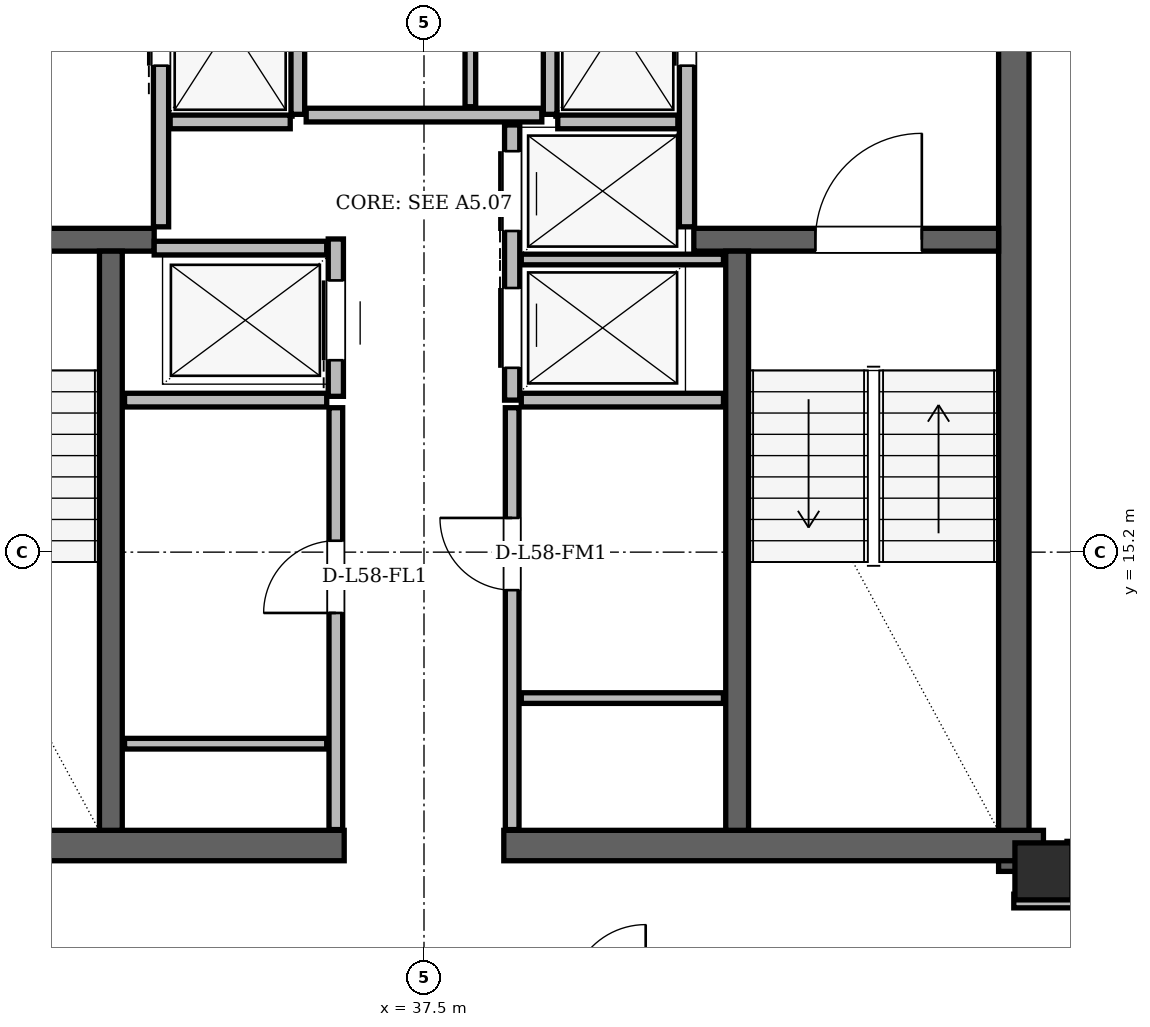
"""IFC4 building model, lengths in metres.
Left out: names, types, materials, properties, quantities, classifications, styles, units other than length and angle.
Written with IfcOpenShell. Run it as: python <this file> out.ifc"""

import sys

from ifc_helpers import new_model, si_unit, direction, frame, frame_2d, origin, origin_2d, place, context, subcontext, project, spatial, rectangle, hollow_rectangle, extrude, element, fill, save


model = new_model("IFC4")
c1 = context("Model", 3, precision=1e-05, world=origin(), true_north=direction((0.0, 1.0)))
c2 = subcontext(c1, "Body", "Model", "MODEL_VIEW")
j1 = project(units=[si_unit("LENGTHUNIT", "METRE"), si_unit("PLANEANGLEUNIT", "RADIAN")], contexts=[c1])
p1 = place(None, origin())
s1 = spatial("IfcSite", under=j1, at=p1, CompositionType="ELEMENT")
p2 = place(p1, origin())
s2 = spatial("IfcBuilding", under=s1, at=p2, CompositionType="ELEMENT")
p3 = place(p2, frame((0.0, 0.0, 219.9)))
s3 = spatial("IfcBuildingStorey", under=s2, at=p3, CompositionType="ELEMENT", Elevation=219.9)
p4 = place(p3, frame((45.65, 11.0, 0.0), z_axis=(0.0, 0.0, 1.0), x_axis=(1.0, 0.0, 0.0)))
e1 = element("IfcColumn", 1, at=p4, inside=s3, PredefinedType="COLUMN", context=c2, shape_type="SweptSolid", body=[
    extrude(hollow_rectangle(XDim=0.75, YDim=0.75, WallThickness=0.06, at=origin_2d()), origin(), (0.0, 0.0, 1.0), 3.6),
])
p5 = place(p3, frame((45.26, 11.0, 0.0), z_axis=(0.0, 0.0, 1.0), x_axis=(0.0, 1.0, 0.0)))
e2 = element("IfcWall", 2, at=p5, inside=s3, PredefinedType="SHEAR", context=c2, shape_type="SweptSolid", body=[
    extrude(rectangle(XDim=13.3, YDim=0.4, at=frame_2d((6.65, 0.0))), origin(), (0.0, 0.0, 1.0), 3.38),
])
for number, where, z_axis, x_axis in (
    (3, (29.35, 11.34, 0.0), (0.0, 0.0, 1.0), (1.0, 0.0, 0.0)),
    (4, (38.55, 11.34, 0.0), (0.0, 0.0, 1.0), (1.0, 0.0, 0.0)),
):
    element("IfcWall", number, at=place(p3, frame(where, z_axis=z_axis, x_axis=x_axis)), inside=s3, PredefinedType="SHEAR", context=c2, shape_type="SweptSolid", body=[
        extrude(rectangle(XDim=7.1, YDim=0.4, at=frame_2d((3.55, 0.0))), origin(), (0.0, 0.0, 1.0), 3.38),
    ])
p6 = place(p3, frame((29.94, 19.31, 0.0), z_axis=(0.0, 0.0, 1.0), x_axis=(1.0, 0.0, 0.0)))
e5 = element("IfcWall", 5, at=p6, inside=s3, PredefinedType="SHEAR", context=c2, shape_type="SweptSolid", body=[
    extrude(rectangle(XDim=4.01, YDim=0.3, at=frame_2d((2.005, 0.0))), origin(), (0.0, 0.0, 1.0), 3.38),
])
p7 = place(p6, frame((1.01, 0.0, 0.0)))
e6 = element("IfcOpeningElement", 6, at=p7, cuts=e5, PredefinedType="OPENING", context=c2, shape_type="SweptSolid", body=[
    extrude(rectangle(XDim=1.4, YDim=2.2, at=frame_2d((0.7, 1.1))), frame((0.0, 0.15, 0.0), z_axis=(0.0, -1.0, 0.0), x_axis=(1.0, 0.0, 0.0)), (0.0, 0.0, 1.0), 0.3),
])
p8 = place(p3, frame((41.05, 19.31, 0.0), z_axis=(0.0, 0.0, 1.0), x_axis=(1.0, 0.0, 0.0)))
e7 = element("IfcWall", 7, at=p8, inside=s3, PredefinedType="SHEAR", context=c2, shape_type="SweptSolid", body=[
    extrude(rectangle(XDim=4.01, YDim=0.3, at=frame_2d((2.005, 0.0))), origin(), (0.0, 0.0, 1.0), 3.38),
])
p9 = place(p8, frame((1.6, 0.0, 0.0)))
e8 = element("IfcOpeningElement", 8, at=p9, cuts=e7, PredefinedType="OPENING", context=c2, shape_type="SweptSolid", body=[
    extrude(rectangle(XDim=1.4, YDim=2.2, at=frame_2d((0.7, 1.1))), frame((0.0, 0.15, 0.0), z_axis=(0.0, -1.0, 0.0), x_axis=(1.0, 0.0, 0.0)), (0.0, 0.0, 1.0), 0.3),
])
for number, where, z_axis, x_axis in (
    (9, (33.38, 11.54, 0.0), (0.0, 0.0, 1.0), (0.0, 1.0, 0.0)),
    (10, (41.62, 11.54, 0.0), (0.0, 0.0, 1.0), (0.0, 1.0, 0.0)),
):
    element("IfcWall", number, at=place(p3, frame(where, z_axis=z_axis, x_axis=x_axis)), inside=s3, PredefinedType="SHEAR", context=c2, shape_type="SweptSolid", body=[
        extrude(rectangle(XDim=7.62, YDim=0.3, at=frame_2d((3.81, 0.0))), origin(), (0.0, 0.0, 1.0), 3.38),
    ])
p10 = place(p3, frame((59.113, 11.428, 0.0), z_axis=(0.0, 0.0, 1.0), x_axis=(-0.499994551211, 0.866028549621, 0.0)))
e11 = element("IfcWall", 11, at=p10, inside=s3, PredefinedType="SOLIDWALL", context=c2, shape_type="SweptSolid", body=[
    extrude(rectangle(XDim=36.634, YDim=0.29, at=frame_2d((18.317, 0.0))), origin(), (0.0, 0.0, 1.0), 2.677),
])
p11 = place(p10, frame((3.429, 0.0, 0.0)))
e12 = element("IfcOpeningElement", 12, at=p11, cuts=e11, PredefinedType="OPENING", context=c2, shape_type="SweptSolid", body=[
    extrude(rectangle(XDim=1.5, YDim=2.2, at=frame_2d((0.75, 1.1))), frame((0.0, 0.145, 0.0), z_axis=(0.0, -1.0, 0.0), x_axis=(1.0, 0.0, 0.0)), (0.0, 0.0, 1.0), 0.29),
])
p12 = place(p10, frame((27.099, 0.0, 0.0)))
e13 = element("IfcOpeningElement", 13, at=p12, cuts=e11, PredefinedType="OPENING", context=c2, shape_type="SweptSolid", body=[
    extrude(rectangle(XDim=1.5, YDim=2.2, at=frame_2d((0.75, 1.1))), frame((0.0, 0.145, 0.0), z_axis=(0.0, -1.0, 0.0), x_axis=(1.0, 0.0, 0.0)), (0.0, 0.0, 1.0), 0.29),
])
p13 = place(p10, frame((7.895, 0.0, 0.85)))
e14 = element("IfcOpeningElement", 14, at=p13, cuts=e11, PredefinedType="OPENING", context=c2, shape_type="SweptSolid", body=[
    extrude(rectangle(XDim=1.2, YDim=1.48, at=frame_2d((0.6, 0.74))), frame((0.0, 0.145, 0.0), z_axis=(0.0, -1.0, 0.0), x_axis=(1.0, 0.0, 0.0)), (0.0, 0.0, 1.0), 0.29),
])
p14 = place(p10, frame((1.262, 0.0, 0.85)))
e15 = element("IfcOpeningElement", 15, at=p14, cuts=e11, PredefinedType="OPENING", context=c2, shape_type="SweptSolid", body=[
    extrude(rectangle(XDim=1.2, YDim=1.48, at=frame_2d((0.6, 0.74))), frame((0.0, 0.145, 0.0), z_axis=(0.0, -1.0, 0.0), x_axis=(1.0, 0.0, 0.0)), (0.0, 0.0, 1.0), 0.29),
])
p15 = place(p10, frame((12.216, 0.0, 0.85)))
e16 = element("IfcOpeningElement", 16, at=p15, cuts=e11, PredefinedType="OPENING", context=c2, shape_type="SweptSolid", body=[
    extrude(rectangle(XDim=2.0, YDim=1.717, at=frame_2d((1.0, 0.858))), frame((0.0, 0.145, 0.0), z_axis=(0.0, -1.0, 0.0), x_axis=(1.0, 0.0, 0.0)), (0.0, 0.0, 1.0), 0.29),
])
p16 = place(p10, frame((17.285, 0.0, 0.85)))
e17 = element("IfcOpeningElement", 17, at=p16, cuts=e11, PredefinedType="OPENING", context=c2, shape_type="SweptSolid", body=[
    extrude(rectangle(XDim=1.4, YDim=1.6, at=frame_2d((0.7, 0.8))), frame((0.0, 0.145, 0.0), z_axis=(0.0, -1.0, 0.0), x_axis=(1.0, 0.0, 0.0)), (0.0, 0.0, 1.0), 0.29),
])
p17 = place(p10, frame((20.673, 0.0, 0.85)))
e18 = element("IfcOpeningElement", 18, at=p17, cuts=e11, PredefinedType="OPENING", context=c2, shape_type="SweptSolid", body=[
    extrude(rectangle(XDim=1.2, YDim=1.48, at=frame_2d((0.6, 0.74))), frame((0.0, 0.145, 0.0), z_axis=(0.0, -1.0, 0.0), x_axis=(1.0, 0.0, 0.0)), (0.0, 0.0, 1.0), 0.29),
])
p18 = place(p10, frame((34.257, 0.0, 0.85)))
e19 = element("IfcOpeningElement", 19, at=p18, cuts=e11, PredefinedType="OPENING", context=c2, shape_type="SweptSolid", body=[
    extrude(rectangle(XDim=1.2, YDim=1.48, at=frame_2d((0.6, 0.74))), frame((0.0, 0.145, 0.0), z_axis=(0.0, -1.0, 0.0), x_axis=(1.0, 0.0, 0.0)), (0.0, 0.0, 1.0), 0.29),
])
p19 = place(p3, frame((34.203, 43.154, 0.0), z_axis=(0.0, 0.0, 1.0), x_axis=(-0.499994551211, -0.866028549621, 0.0)))
e20 = element("IfcWall", 20, at=p19, inside=s3, PredefinedType="SOLIDWALL", context=c2, shape_type="SweptSolid", body=[
    extrude(rectangle(XDim=36.634, YDim=0.29, at=frame_2d((18.317, 0.0))), origin(), (0.0, 0.0, 1.0), 2.677),
])
p20 = place(p19, frame((3.429, 0.0, 0.0)))
e21 = element("IfcOpeningElement", 21, at=p20, cuts=e20, PredefinedType="OPENING", context=c2, shape_type="SweptSolid", body=[
    extrude(rectangle(XDim=1.5, YDim=2.2, at=frame_2d((0.75, 1.1))), frame((0.0, 0.145, 0.0), z_axis=(0.0, -1.0, 0.0), x_axis=(1.0, 0.0, 0.0)), (0.0, 0.0, 1.0), 0.29),
])
p21 = place(p19, frame((27.099, 0.0, 0.0)))
e22 = element("IfcOpeningElement", 22, at=p21, cuts=e20, PredefinedType="OPENING", context=c2, shape_type="SweptSolid", body=[
    extrude(rectangle(XDim=1.5, YDim=2.2, at=frame_2d((0.75, 1.1))), frame((0.0, 0.145, 0.0), z_axis=(0.0, -1.0, 0.0), x_axis=(1.0, 0.0, 0.0)), (0.0, 0.0, 1.0), 0.29),
])
p22 = place(p19, frame((22.904, 0.0, 0.85)))
e23 = element("IfcOpeningElement", 23, at=p22, cuts=e20, PredefinedType="OPENING", context=c2, shape_type="SweptSolid", body=[
    extrude(rectangle(XDim=1.2, YDim=1.48, at=frame_2d((0.6, 0.74))), frame((0.0, 0.145, 0.0), z_axis=(0.0, -1.0, 0.0), x_axis=(1.0, 0.0, 0.0)), (0.0, 0.0, 1.0), 0.29),
])
p23 = place(p19, frame((33.102, 0.0, 0.85)))
e24 = element("IfcOpeningElement", 24, at=p23, cuts=e20, PredefinedType="OPENING", context=c2, shape_type="SweptSolid", body=[
    extrude(rectangle(XDim=1.2, YDim=1.48, at=frame_2d((0.6, 0.74))), frame((0.0, 0.145, 0.0), z_axis=(0.0, -1.0, 0.0), x_axis=(1.0, 0.0, 0.0)), (0.0, 0.0, 1.0), 0.29),
])
p24 = place(p19, frame((8.475, 0.0, 0.85)))
e25 = element("IfcOpeningElement", 25, at=p24, cuts=e20, PredefinedType="OPENING", context=c2, shape_type="SweptSolid", body=[
    extrude(rectangle(XDim=1.2, YDim=1.48, at=frame_2d((0.6, 0.74))), frame((0.0, 0.145, 0.0), z_axis=(0.0, -1.0, 0.0), x_axis=(1.0, 0.0, 0.0)), (0.0, 0.0, 1.0), 0.29),
])
p25 = place(p19, frame((15.529, 0.0, 0.85)))
e26 = element("IfcOpeningElement", 26, at=p25, cuts=e20, PredefinedType="OPENING", context=c2, shape_type="SweptSolid", body=[
    extrude(rectangle(XDim=2.8, YDim=1.717, at=frame_2d((1.4, 0.858))), frame((0.0, 0.145, 0.0), z_axis=(0.0, -1.0, 0.0), x_axis=(1.0, 0.0, 0.0)), (0.0, 0.0, 1.0), 0.29),
])
p26 = place(p19, frame((1.5, 0.0, 0.85)))
e27 = element("IfcOpeningElement", 27, at=p26, cuts=e20, PredefinedType="OPENING", context=c2, shape_type="SweptSolid", body=[
    extrude(rectangle(XDim=1.2, YDim=1.48, at=frame_2d((0.6, 0.74))), frame((0.0, 0.145, 0.0), z_axis=(0.0, -1.0, 0.0), x_axis=(1.0, 0.0, 0.0)), (0.0, 0.0, 1.0), 0.29),
])
p27 = place(p3, frame((34.04, 19.48, 0.0), z_axis=(0.0, 0.0, 1.0), x_axis=(0.0, 1.0, 0.0)))
e28 = element("IfcWall", 28, at=p27, inside=s3, PredefinedType="PARTITIONING", context=c2, shape_type="SweptSolid", body=[
    extrude(rectangle(XDim=4.5, YDim=0.2, at=frame_2d((2.25, 0.0))), origin(), (0.0, 0.0, 1.0), 3.38),
])
p28 = place(p27, frame((2.12, 0.0, 0.0)))
e29 = element("IfcOpeningElement", 29, at=p28, cuts=e28, PredefinedType="OPENING", context=c2, shape_type="SweptSolid", body=[
    extrude(rectangle(XDim=1.1, YDim=2.2, at=frame_2d((0.55, 1.1))), frame((0.0, 0.1, 0.0), z_axis=(0.0, -1.0, 0.0), x_axis=(1.0, 0.0, 0.0)), (0.0, 0.0, 1.0), 0.2),
])
p29 = place(p3, frame((35.84, 20.96, 0.0), z_axis=(0.0, 0.0, 1.0), x_axis=(0.0, 1.0, 0.0)))
e30 = element("IfcWall", 30, at=p29, inside=s3, PredefinedType="PARTITIONING", context=c2, shape_type="SweptSolid", body=[
    extrude(rectangle(XDim=3.02, YDim=0.18, at=frame_2d((1.51, 0.0))), origin(), (0.0, 0.0, 1.0), 3.38),
])
p30 = place(p3, frame((34.16, 20.86, 0.0), z_axis=(0.0, 0.0, 1.0), x_axis=(1.0, 0.0, 0.0)))
e31 = element("IfcWall", 31, at=p30, inside=s3, PredefinedType="PARTITIONING", context=c2, shape_type="SweptSolid", body=[
    extrude(rectangle(XDim=1.58, YDim=0.18, at=frame_2d((0.79, 0.0))), origin(), (0.0, 0.0, 1.0), 3.38),
])
p31 = place(p3, frame((40.96, 19.48, 0.0), z_axis=(0.0, 0.0, 1.0), x_axis=(0.0, 1.0, 0.0)))
e32 = element("IfcWall", 32, at=p31, inside=s3, PredefinedType="PARTITIONING", context=c2, shape_type="SweptSolid", body=[
    extrude(rectangle(XDim=4.5, YDim=0.2, at=frame_2d((2.25, 0.0))), origin(), (0.0, 0.0, 1.0), 3.38),
])
p32 = place(p31, frame((2.12, 0.0, 0.0)))
e33 = element("IfcOpeningElement", 33, at=p32, cuts=e32, PredefinedType="OPENING", context=c2, shape_type="SweptSolid", body=[
    extrude(rectangle(XDim=1.1, YDim=2.2, at=frame_2d((0.55, 1.1))), frame((0.0, 0.1, 0.0), z_axis=(0.0, -1.0, 0.0), x_axis=(1.0, 0.0, 0.0)), (0.0, 0.0, 1.0), 0.2),
])
p33 = place(p3, frame((39.16, 20.96, 0.0), z_axis=(0.0, 0.0, 1.0), x_axis=(0.0, 1.0, 0.0)))
e34 = element("IfcWall", 34, at=p33, inside=s3, PredefinedType="PARTITIONING", context=c2, shape_type="SweptSolid", body=[
    extrude(rectangle(XDim=3.02, YDim=0.18, at=frame_2d((1.51, 0.0))), origin(), (0.0, 0.0, 1.0), 3.38),
])
p34 = place(p3, frame((39.26, 20.86, 0.0), z_axis=(0.0, 0.0, 1.0), x_axis=(1.0, 0.0, 0.0)))
e35 = element("IfcWall", 35, at=p34, inside=s3, PredefinedType="PARTITIONING", context=c2, shape_type="SweptSolid", body=[
    extrude(rectangle(XDim=1.58, YDim=0.18, at=frame_2d((0.79, 0.0))), origin(), (0.0, 0.0, 1.0), 3.38),
])
p35 = place(p3, frame((36.34, 17.25, 0.0), z_axis=(0.0, 0.0, 1.0), x_axis=(0.0, 1.0, 0.0)))
e36 = element("IfcWall", 36, at=p35, inside=s3, PredefinedType="PARTITIONING", context=c2, shape_type="SweptSolid", body=[
    extrude(rectangle(XDim=2.07, YDim=0.2, at=frame_2d((1.035, 0.0))), origin(), (0.0, 0.0, 1.0), 3.38),
])
p36 = place(p35, frame((0.475, 0.0, 0.0)))
e37 = element("IfcOpeningElement", 37, at=p36, cuts=e36, PredefinedType="OPENING", context=c2, shape_type="SweptSolid", body=[
    extrude(rectangle(XDim=1.05, YDim=2.15, at=frame_2d((0.525, 1.075))), frame((0.0, 0.1, 0.0), z_axis=(0.0, -1.0, 0.0), x_axis=(1.0, 0.0, 0.0)), (0.0, 0.0, 1.0), 0.2),
])
p37 = place(p3, frame((33.95, 19.2, 0.0), z_axis=(0.0, 0.0, 1.0), x_axis=(1.0, 0.0, 0.0)))
e38 = element("IfcWall", 38, at=p37, inside=s3, PredefinedType="PARTITIONING", context=c2, shape_type="SweptSolid", body=[
    extrude(rectangle(XDim=2.27, YDim=0.18, at=frame_2d((1.135, 0.0))), origin(), (0.0, 0.0, 1.0), 3.38),
])
p38 = place(p3, frame((33.56, 17.2, 0.0), z_axis=(0.0, 0.0, 1.0), x_axis=(1.0, 0.0, 0.0)))
e39 = element("IfcWall", 39, at=p38, inside=s3, PredefinedType="PARTITIONING", context=c2, shape_type="SweptSolid", body=[
    extrude(rectangle(XDim=2.66, YDim=0.18, at=frame_2d((1.33, 0.0))), origin(), (0.0, 0.0, 1.0), 3.38),
])
p39 = place(p3, frame((36.34, 11.55, 0.0), z_axis=(0.0, 0.0, 1.0), x_axis=(0.0, 1.0, 0.0)))
e40 = element("IfcWall", 40, at=p39, inside=s3, PredefinedType="PARTITIONING", context=c2, shape_type="SweptSolid", body=[
    extrude(rectangle(XDim=5.55, YDim=0.18, at=frame_2d((2.775, 0.0))), origin(), (0.0, 0.0, 1.0), 3.38),
])
p40 = place(p39, frame((2.85, 0.0, 0.0)))
e41 = element("IfcOpeningElement", 41, at=p40, cuts=e40, PredefinedType="OPENING", context=c2, shape_type="SweptSolid", body=[
    extrude(rectangle(XDim=0.95, YDim=2.1, at=frame_2d((0.475, 1.05))), frame((0.0, 0.09, 0.0), z_axis=(0.0, -1.0, 0.0), x_axis=(1.0, 0.0, 0.0)), (0.0, 0.0, 1.0), 0.18),
])
p41 = place(p3, frame((33.56, 12.68, 0.0), z_axis=(0.0, 0.0, 1.0), x_axis=(1.0, 0.0, 0.0)))
e42 = element("IfcWall", 42, at=p41, inside=s3, PredefinedType="PARTITIONING", context=c2, shape_type="SweptSolid", body=[
    extrude(rectangle(XDim=2.66, YDim=0.14, at=frame_2d((1.33, 0.0))), origin(), (0.0, 0.0, 1.0), 3.38),
])
p42 = place(p3, frame((38.66, 17.2, 0.0), z_axis=(0.0, 0.0, 1.0), x_axis=(0.0, 1.0, 0.0)))
e43 = element("IfcWall", 43, at=p42, inside=s3, PredefinedType="PARTITIONING", context=c2, shape_type="SweptSolid", body=[
    extrude(rectangle(XDim=3.62, YDim=0.2, at=frame_2d((1.81, 0.0))), origin(), (0.0, 0.0, 1.0), 3.38),
])
p43 = place(p42, frame((0.425, 0.0, 0.0)))
e44 = element("IfcOpeningElement", 44, at=p43, cuts=e43, PredefinedType="OPENING", context=c2, shape_type="SweptSolid", body=[
    extrude(rectangle(XDim=1.05, YDim=2.15, at=frame_2d((0.525, 1.075))), frame((0.0, 0.1, 0.0), z_axis=(0.0, -1.0, 0.0), x_axis=(1.0, 0.0, 0.0)), (0.0, 0.0, 1.0), 0.2),
])
p44 = place(p42, frame((2.225, 0.0, 0.0)))
e45 = element("IfcOpeningElement", 45, at=p44, cuts=e43, PredefinedType="OPENING", context=c2, shape_type="SweptSolid", body=[
    extrude(rectangle(XDim=1.05, YDim=2.15, at=frame_2d((0.525, 1.075))), frame((0.0, 0.1, 0.0), z_axis=(0.0, -1.0, 0.0), x_axis=(1.0, 0.0, 0.0)), (0.0, 0.0, 1.0), 0.2),
])
p45 = place(p3, frame((38.78, 17.2, 0.0), z_axis=(0.0, 0.0, 1.0), x_axis=(1.0, 0.0, 0.0)))
e46 = element("IfcWall", 46, at=p45, inside=s3, PredefinedType="PARTITIONING", context=c2, shape_type="SweptSolid", body=[
    extrude(rectangle(XDim=2.66, YDim=0.18, at=frame_2d((1.33, 0.0))), origin(), (0.0, 0.0, 1.0), 3.38),
])
p46 = place(p3, frame((38.78, 19.05, 0.0), z_axis=(0.0, 0.0, 1.0), x_axis=(1.0, 0.0, 0.0)))
e47 = element("IfcWall", 47, at=p46, inside=s3, PredefinedType="PARTITIONING", context=c2, shape_type="SweptSolid", body=[
    extrude(rectangle(XDim=2.66, YDim=0.14, at=frame_2d((1.33, 0.0))), origin(), (0.0, 0.0, 1.0), 3.38),
])
p47 = place(p3, frame((38.66, 11.55, 0.0), z_axis=(0.0, 0.0, 1.0), x_axis=(0.0, 1.0, 0.0)))
e48 = element("IfcWall", 48, at=p47, inside=s3, PredefinedType="PARTITIONING", context=c2, shape_type="SweptSolid", body=[
    extrude(rectangle(XDim=5.55, YDim=0.18, at=frame_2d((2.775, 0.0))), origin(), (0.0, 0.0, 1.0), 3.38),
])
p48 = place(p47, frame((3.15, 0.0, 0.0)))
e49 = element("IfcOpeningElement", 49, at=p48, cuts=e48, PredefinedType="OPENING", context=c2, shape_type="SweptSolid", body=[
    extrude(rectangle(XDim=0.95, YDim=2.1, at=frame_2d((0.475, 1.05))), frame((0.0, 0.09, 0.0), z_axis=(0.0, -1.0, 0.0), x_axis=(1.0, 0.0, 0.0)), (0.0, 0.0, 1.0), 0.18),
])
p49 = place(p3, frame((38.78, 13.28, 0.0), z_axis=(0.0, 0.0, 1.0), x_axis=(1.0, 0.0, 0.0)))
e50 = element("IfcWall", 50, at=p49, inside=s3, PredefinedType="PARTITIONING", context=c2, shape_type="SweptSolid", body=[
    extrude(rectangle(XDim=2.66, YDim=0.14, at=frame_2d((1.33, 0.0))), origin(), (0.0, 0.0, 1.0), 3.38),
])
p50 = place(p3, frame((35.95, 20.95, 0.0), z_axis=(0.0, 0.0, 1.0), x_axis=(1.0, 0.0, 0.0)))
e51 = element("IfcWall", 51, at=p50, inside=s3, PredefinedType="PARTITIONING", context=c2, shape_type="SweptSolid", body=[
    extrude(rectangle(XDim=3.1, YDim=0.18, at=frame_2d((1.55, 0.0))), origin(), (0.0, 0.0, 1.0), 3.38),
])
p51 = place(p3, frame((38.11, 21.06, 0.0), z_axis=(0.0, 0.0, 1.0), x_axis=(0.0, 1.0, 0.0)))
e52 = element("IfcWall", 52, at=p51, inside=s3, PredefinedType="PARTITIONING", context=c2, shape_type="SweptSolid", body=[
    extrude(rectangle(XDim=2.92, YDim=0.14, at=frame_2d((1.46, 0.0))), origin(), (0.0, 0.0, 1.0), 3.38),
])
p52 = place(p3, frame((45.26, 10.61, 0.0), z_axis=(0.0, 0.0, 1.0), x_axis=(1.0, 0.0, 0.0)))
e53 = element("IfcWall", 53, at=p52, inside=s3, PredefinedType="PARTITIONING", context=c2, shape_type="SweptSolid", body=[
    extrude(rectangle(XDim=0.78, YDim=0.18, at=frame_2d((0.39, 0.0))), origin(), (0.0, 0.0, 1.0), 3.38),
])
p53 = place(p3, frame((46.05, 10.95, 0.0), z_axis=(0.0, 0.0, 1.0), x_axis=(0.0, 1.0, 0.0)))
e54 = element("IfcWall", 54, at=p53, inside=s3, PredefinedType="PARTITIONING", context=c2, shape_type="SweptSolid", body=[
    extrude(rectangle(XDim=0.445, YDim=0.18, at=frame_2d((0.223, 0.0))), origin(), (0.0, 0.0, 1.0), 2.913),
])
p54 = place(p40, origin())
e55 = element("IfcDoor", 55, at=p54, inside=s3, OperationType="SINGLE_SWING_LEFT", PredefinedType="DOOR", context=c2, shape_type="SweptSolid", body=[
    extrude(rectangle(XDim=0.95, YDim=2.1, at=frame_2d((0.475, 1.05))), frame((0.0, 0.025, 0.0), z_axis=(0.0, -1.0, 0.0), x_axis=(1.0, 0.0, 0.0)), (0.0, 0.0, 1.0), 0.05),
])
fill(e41, e55)
p55 = place(p48, origin())
e56 = element("IfcDoor", 56, at=p55, inside=s3, OperationType="SINGLE_SWING_RIGHT", PredefinedType="DOOR", context=c2, shape_type="SweptSolid", body=[
    extrude(rectangle(XDim=0.95, YDim=2.1, at=frame_2d((0.475, 1.05))), frame((0.0, 0.025, 0.0), z_axis=(0.0, -1.0, 0.0), x_axis=(1.0, 0.0, 0.0)), (0.0, 0.0, 1.0), 0.05),
])
fill(e49, e56)
p56 = place(p28, origin())
e57 = element("IfcDoor", 57, at=p56, inside=s3, OperationType="SLIDING_TO_LEFT", PredefinedType="DOOR", context=c2, shape_type="SweptSolid", body=[
    extrude(rectangle(XDim=1.1, YDim=2.2, at=frame_2d((0.55, 1.1))), frame((0.0, 0.025, 0.0), z_axis=(0.0, -1.0, 0.0), x_axis=(1.0, 0.0, 0.0)), (0.0, 0.0, 1.0), 0.05),
])
fill(e29, e57)
p57 = place(p32, origin())
e58 = element("IfcDoor", 58, at=p57, inside=s3, OperationType="SLIDING_TO_RIGHT", PredefinedType="DOOR", context=c2, shape_type="SweptSolid", body=[
    extrude(rectangle(XDim=1.1, YDim=2.2, at=frame_2d((0.55, 1.1))), frame((0.0, 0.025, 0.0), z_axis=(0.0, -1.0, 0.0), x_axis=(1.0, 0.0, 0.0)), (0.0, 0.0, 1.0), 0.05),
])
fill(e33, e58)
p58 = place(p36, origin())
e59 = element("IfcDoor", 59, at=p58, inside=s3, OperationType="SLIDING_TO_LEFT", PredefinedType="DOOR", context=c2, shape_type="SweptSolid", body=[
    extrude(rectangle(XDim=1.05, YDim=2.15, at=frame_2d((0.525, 1.075))), frame((0.0, 0.025, 0.0), z_axis=(0.0, -1.0, 0.0), x_axis=(1.0, 0.0, 0.0)), (0.0, 0.0, 1.0), 0.05),
])
fill(e37, e59)
p59 = place(p43, origin())
e60 = element("IfcDoor", 60, at=p59, inside=s3, OperationType="SLIDING_TO_RIGHT", PredefinedType="DOOR", context=c2, shape_type="SweptSolid", body=[
    extrude(rectangle(XDim=1.05, YDim=2.15, at=frame_2d((0.525, 1.075))), frame((0.0, 0.025, 0.0), z_axis=(0.0, -1.0, 0.0), x_axis=(1.0, 0.0, 0.0)), (0.0, 0.0, 1.0), 0.05),
])
fill(e44, e60)
p60 = place(p44, origin())
e61 = element("IfcDoor", 61, at=p60, inside=s3, OperationType="SLIDING_TO_LEFT", PredefinedType="DOOR", context=c2, shape_type="SweptSolid", body=[
    extrude(rectangle(XDim=1.05, YDim=2.15, at=frame_2d((0.525, 1.075))), frame((0.0, 0.025, 0.0), z_axis=(0.0, -1.0, 0.0), x_axis=(1.0, 0.0, 0.0)), (0.0, 0.0, 1.0), 0.05),
])
fill(e45, e61)
p61 = place(p9, origin())
e62 = element("IfcDoor", 62, at=p61, inside=s3, OperationType="SINGLE_SWING_RIGHT", PredefinedType="DOOR", context=c2, shape_type="SweptSolid", body=[
    extrude(rectangle(XDim=1.4, YDim=2.2, at=frame_2d((0.7, 1.1))), frame((0.0, 0.025, 0.0), z_axis=(0.0, -1.0, 0.0), x_axis=(1.0, 0.0, 0.0)), (0.0, 0.0, 1.0), 0.05),
])
fill(e8, e62)
save(model, sys.argv[1])
